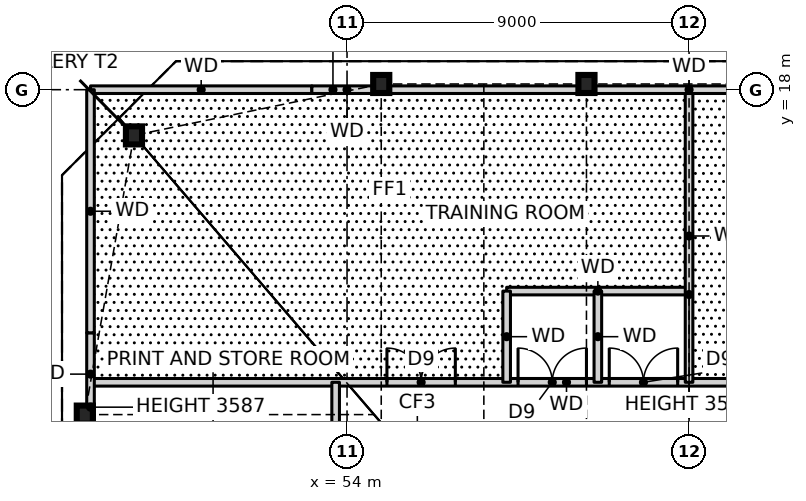
"""IFC4 building model, lengths in metres.
Left out: names, types, materials, properties, quantities, classifications, styles, units other than length and angle.
Written with IfcOpenShell. Run it as: python <this file> out.ifc"""

import sys

from ifc_helpers import new_model, si_unit, direction, frame, frame_2d, origin, origin_2d, place, context, subcontext, project, spatial, rectangle, i_section, extrude, element, fill, save


model = new_model("IFC4")
c1 = context("Model", 3, precision=1e-05, world=origin(), true_north=direction((0.0, 1.0)))
c2 = subcontext(c1, "Body", "Model", "MODEL_VIEW")
j1 = project(units=[si_unit("LENGTHUNIT", "METRE"), si_unit("PLANEANGLEUNIT", "RADIAN")], contexts=[c1])
p1 = place(None, origin())
s1 = spatial("IfcSite", under=j1, at=p1, CompositionType="ELEMENT")
p2 = place(p1, origin())
s2 = spatial("IfcBuilding", under=s1, at=p2, CompositionType="ELEMENT")
p3 = place(p2, frame((0.0, 0.0, 10.5)))
s3 = spatial("IfcBuildingStorey", under=s2, at=p3, CompositionType="ELEMENT", Elevation=10.5)
for number, where, z_axis, x_axis in (
    (1, (60.3, 18.15, 0.0), (0.0, 0.0, 1.0), (1.0, 0.0, 0.0)),
    (2, (54.9, 18.15, 0.0), (0.0, 0.0, 1.0), (1.0, 0.0, 0.0)),
    (3, (48.394, 16.797, 0.0), (0.0, 0.0, 1.0), (1.0, 0.0, 0.0)),
    (4, (47.1, 9.45, 0.0), (0.0, 0.0, 1.0), (1.0, 0.0, 0.0)),
):
    element("IfcColumn", number, at=place(p3, frame(where, z_axis=z_axis, x_axis=x_axis)), inside=s3, PredefinedType="COLUMN", context=c2, shape_type="SweptSolid", body=[
        extrude(i_section(OverallWidth=0.424, OverallDepth=0.475, WebThickness=0.048, FlangeThickness=0.077, at=origin_2d()), origin(), (0.0, 0.0, 1.0), 4.5),
    ])
p4 = place(p3, frame((47.25, 10.3, 0.0), z_axis=(0.0, 0.0, 1.0), x_axis=(1.0, 0.0, 0.0)))
e5 = element("IfcWall", 5, at=p4, inside=s3, PredefinedType="SOLIDWALL", context=c2, shape_type="SweptSolid", body=[
    extrude(rectangle(XDim=25.05, YDim=0.2, at=frame_2d((12.525, 0.0))), origin(), (0.0, 0.0, 1.0), 4.25),
])
p5 = place(p4, frame((19.5, 0.0, 0.0)))
e6 = element("IfcOpeningElement", 6, at=p5, cuts=e5, PredefinedType="OPENING", context=c2, shape_type="SweptSolid", body=[
    extrude(rectangle(XDim=1.8, YDim=2.1, at=frame_2d((0.9, 1.05))), frame((0.0, 0.11, 0.0), z_axis=(0.0, -1.0, 0.0), x_axis=(1.0, 0.0, 0.0)), (0.0, 0.0, 1.0), 0.22),
])
p6 = place(p4, frame((13.65, 0.0, 0.0)))
e7 = element("IfcOpeningElement", 7, at=p6, cuts=e5, PredefinedType="OPENING", context=c2, shape_type="SweptSolid", body=[
    extrude(rectangle(XDim=1.8, YDim=2.1, at=frame_2d((0.9, 1.05))), frame((0.0, 0.11, 0.0), z_axis=(0.0, -1.0, 0.0), x_axis=(1.0, 0.0, 0.0)), (0.0, 0.0, 1.0), 0.22),
])
p7 = place(p4, frame((11.25, 0.0, 0.0)))
e8 = element("IfcOpeningElement", 8, at=p7, cuts=e5, PredefinedType="OPENING", context=c2, shape_type="SweptSolid", body=[
    extrude(rectangle(XDim=1.8, YDim=2.1, at=frame_2d((0.9, 1.05))), frame((0.0, 0.11, 0.0), z_axis=(0.0, -1.0, 0.0), x_axis=(1.0, 0.0, 0.0)), (0.0, 0.0, 1.0), 0.22),
])
p8 = place(p4, frame((7.8, 0.0, 0.0)))
e9 = element("IfcOpeningElement", 9, at=p8, cuts=e5, PredefinedType="OPENING", context=c2, shape_type="SweptSolid", body=[
    extrude(rectangle(XDim=1.8, YDim=2.1, at=frame_2d((0.9, 1.05))), frame((0.0, 0.11, 0.0), z_axis=(0.0, -1.0, 0.0), x_axis=(1.0, 0.0, 0.0)), (0.0, 0.0, 1.0), 0.22),
])
p9 = place(p3, frame((58.2, 12.7, 0.0), z_axis=(0.0, 0.0, 1.0), x_axis=(1.0, 0.0, 0.0)))
e10 = element("IfcWall", 10, at=p9, inside=s3, PredefinedType="SOLIDWALL", context=c2, shape_type="SweptSolid", body=[
    extrude(rectangle(XDim=4.8, YDim=0.2, at=frame_2d((2.4, 0.0))), origin(), (0.0, 0.0, 1.0), 4.25),
])
p10 = place(p3, frame((47.25, 18.0, 0.0), z_axis=(0.0, 0.0, 1.0), x_axis=(1.0, 0.0, 0.0)))
e11 = element("IfcWall", 11, at=p10, inside=s3, PredefinedType="SOLIDWALL", context=c2, shape_type="SweptSolid", body=[
    extrude(rectangle(XDim=5.824, YDim=0.2, at=frame_2d((2.912, 0.0))), origin(), (0.0, 0.0, 1.0), 4.25),
])
p11 = place(p3, frame((63.0, 10.3, 0.0), z_axis=(0.0, 0.0, 1.0), x_axis=(0.0, 1.0, 0.0)))
e12 = element("IfcWall", 12, at=p11, inside=s3, PredefinedType="SOLIDWALL", context=c2, shape_type="SweptSolid", body=[
    extrude(rectangle(XDim=7.7, YDim=0.2, at=frame_2d((3.85, 0.0))), origin(), (0.0, 0.0, 1.0), 3.587),
])
for number, where, z_axis, x_axis in (
    (13, (60.6, 10.3, 0.0), (0.0, 0.0, 1.0), (0.0, 1.0, 0.0)),
    (14, (58.2, 10.3, 0.0), (0.0, 0.0, 1.0), (0.0, 1.0, 0.0)),
):
    element("IfcWall", number, at=place(p3, frame(where, z_axis=z_axis, x_axis=x_axis)), inside=s3, PredefinedType="SOLIDWALL", context=c2, shape_type="SweptSolid", body=[
        extrude(rectangle(XDim=2.4, YDim=0.2, at=frame_2d((1.2, 0.0))), origin(), (0.0, 0.0, 1.0), 4.25),
    ])
p12 = place(p3, frame((53.7, -18.0, 0.0), z_axis=(0.0, 0.0, 1.0), x_axis=(0.0, 1.0, 0.0)))
e15 = element("IfcWall", 15, at=p12, inside=s3, PredefinedType="SOLIDWALL", context=c2, shape_type="SweptSolid", body=[
    extrude(rectangle(XDim=28.3, YDim=0.2, at=frame_2d((14.15, 0.0))), origin(), (0.0, 0.0, 1.0), 4.25),
])
p13 = place(p12, frame((15.4, 0.0, 0.0)))
e16 = element("IfcOpeningElement", 16, at=p13, cuts=e15, PredefinedType="OPENING", context=c2, shape_type="SweptSolid", body=[
    extrude(rectangle(XDim=1.8, YDim=2.1, at=frame_2d((0.9, 1.05))), frame((0.0, 0.11, 0.0), z_axis=(0.0, -1.0, 0.0), x_axis=(1.0, 0.0, 0.0)), (0.0, 0.0, 1.0), 0.22),
])
p14 = place(p12, frame((25.4, 0.0, 0.0)))
e17 = element("IfcOpeningElement", 17, at=p14, cuts=e15, PredefinedType="OPENING", context=c2, shape_type="SweptSolid", body=[
    extrude(rectangle(XDim=1.8, YDim=2.1, at=frame_2d((0.9, 1.05))), frame((0.0, 0.11, 0.0), z_axis=(0.0, -1.0, 0.0), x_axis=(1.0, 0.0, 0.0)), (0.0, 0.0, 1.0), 0.22),
])
p15 = place(p12, frame((8.55, 0.0, 0.0)))
e18 = element("IfcOpeningElement", 18, at=p15, cuts=e15, PredefinedType="OPENING", context=c2, shape_type="SweptSolid", body=[
    extrude(rectangle(XDim=1.8, YDim=2.1, at=frame_2d((0.9, 1.05))), frame((0.0, 0.11, 0.0), z_axis=(0.0, -1.0, 0.0), x_axis=(1.0, 0.0, 0.0)), (0.0, 0.0, 1.0), 0.22),
])
p16 = place(p3, frame((53.074, 18.0, 0.0), z_axis=(0.0, 0.0, 1.0), x_axis=(1.0, 0.0, 0.0)))
e19 = element("IfcWall", 19, at=p16, inside=s3, PredefinedType="SOLIDWALL", context=c2, shape_type="SweptSolid", body=[
    extrude(rectangle(XDim=1.852, YDim=0.2, at=frame_2d((0.926, 0.0))), origin(), (0.0, 0.0, 1.0), 3.587),
])
p17 = place(p3, frame((54.926, 18.0, 0.0), z_axis=(0.0, 0.0, 1.0), x_axis=(1.0, 0.0, 0.0)))
e20 = element("IfcWall", 20, at=p17, inside=s3, PredefinedType="SOLIDWALL", context=c2, shape_type="SweptSolid", body=[
    extrude(rectangle(XDim=16.148, YDim=0.2, at=frame_2d((8.074, 0.0))), origin(), (0.0, 0.0, 1.0), 4.25),
])
p18 = place(p3, frame((47.25, -9.428, 0.0), z_axis=(0.0, 0.0, 1.0), x_axis=(0.0, 1.0, 0.0)))
e21 = element("IfcWall", 21, at=p18, inside=s3, PredefinedType="SOLIDWALL", context=c2, shape_type="SweptSolid", body=[
    extrude(rectangle(XDim=18.856, YDim=0.2, at=frame_2d((9.428, 0.0))), origin(), (0.0, 0.0, 1.0), 4.25),
])
p19 = place(p3, frame((47.25, 9.428, 0.0), z_axis=(0.0, 0.0, 1.0), x_axis=(0.0, 1.0, 0.0)))
e22 = element("IfcWall", 22, at=p19, inside=s3, PredefinedType="SOLIDWALL", context=c2, shape_type="SweptSolid", body=[
    extrude(rectangle(XDim=2.174, YDim=0.2, at=frame_2d((1.087, 0.0))), origin(), (0.0, 0.0, 1.0), 3.587),
])
p20 = place(p3, frame((47.25, 11.602, 0.0), z_axis=(0.0, 0.0, 1.0), x_axis=(0.0, 1.0, 0.0)))
e23 = element("IfcWall", 23, at=p20, inside=s3, PredefinedType="SOLIDWALL", context=c2, shape_type="SweptSolid", body=[
    extrude(rectangle(XDim=6.398, YDim=0.2, at=frame_2d((3.199, 0.0))), origin(), (0.0, 0.0, 1.0), 4.25),
])
p21 = place(p6, origin())
e24 = element("IfcDoor", 24, at=p21, inside=s3, OperationType="DOUBLE_DOOR_SINGLE_SWING", PredefinedType="DOOR", context=c2, shape_type="SweptSolid", body=[
    extrude(rectangle(XDim=1.8, YDim=2.1, at=frame_2d((0.9, 1.05))), frame((0.0, 0.025, 0.0), z_axis=(0.0, -1.0, 0.0), x_axis=(1.0, 0.0, 0.0)), (0.0, 0.0, 1.0), 0.05),
])
fill(e7, e24)
p22 = place(p7, origin())
e25 = element("IfcDoor", 25, at=p22, inside=s3, OperationType="DOUBLE_DOOR_SINGLE_SWING", PredefinedType="DOOR", context=c2, shape_type="SweptSolid", body=[
    extrude(rectangle(XDim=1.8, YDim=2.1, at=frame_2d((0.9, 1.05))), frame((0.0, 0.025, 0.0), z_axis=(0.0, -1.0, 0.0), x_axis=(1.0, 0.0, 0.0)), (0.0, 0.0, 1.0), 0.05),
])
fill(e8, e25)
p23 = place(p8, origin())
e26 = element("IfcDoor", 26, at=p23, inside=s3, OperationType="DOUBLE_DOOR_SINGLE_SWING", PredefinedType="DOOR", context=c2, shape_type="SweptSolid", body=[
    extrude(rectangle(XDim=1.8, YDim=2.1, at=frame_2d((0.9, 1.05))), frame((0.0, 0.025, 0.0), z_axis=(0.0, -1.0, 0.0), x_axis=(1.0, 0.0, 0.0)), (0.0, 0.0, 1.0), 0.05),
])
fill(e9, e26)
save(model, sys.argv[1])
